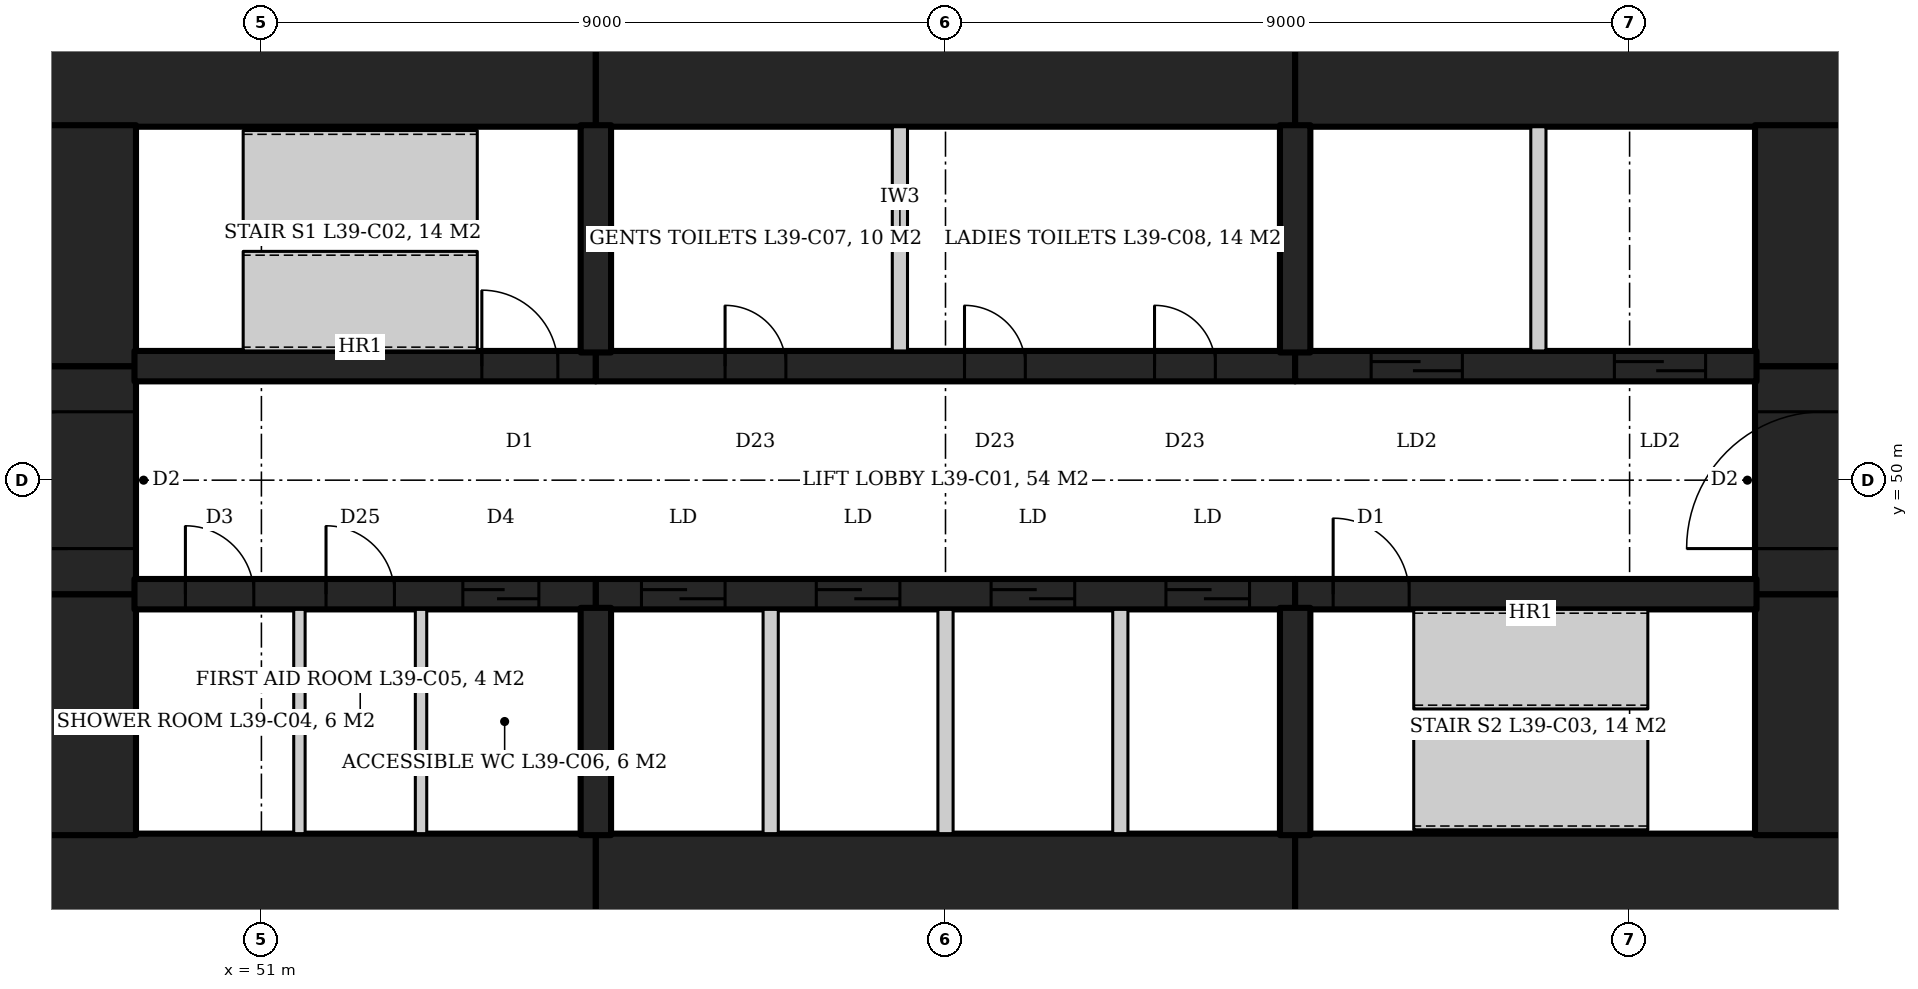
"""IFC4 building model, lengths in metres.
Left out: names, types, materials, properties, quantities, classifications, styles, units other than length and angle.
Written with IfcOpenShell. Run it as: python <this file> out.ifc"""

import sys

from ifc_helpers import new_model, si_unit, direction, frame, frame_2d, origin, place, context, subcontext, project, spatial, rectangle, extrude, element, fill, save


model = new_model("IFC4")
c1 = context("Model", 3, precision=1e-05, world=origin(), true_north=direction((0.0, 1.0)))
c2 = subcontext(c1, "Body", "Model", "MODEL_VIEW")
j1 = project(units=[si_unit("LENGTHUNIT", "METRE"), si_unit("PLANEANGLEUNIT", "RADIAN")], contexts=[c1])
p1 = place(None, origin())
s1 = spatial("IfcSite", under=j1, at=p1, CompositionType="ELEMENT")
p2 = place(p1, origin())
s2 = spatial("IfcBuilding", under=s1, at=p2, CompositionType="ELEMENT")
p3 = place(p2, frame((0.0, 0.0, 173.0)))
s3 = spatial("IfcBuildingStorey", under=s2, at=p3, CompositionType="ELEMENT", Elevation=173.0)
p4 = place(p3, frame((47.55, 55.55, 0.0), z_axis=(0.0, 0.0, 1.0), x_axis=(1.0, 0.0, 0.0)))
e1 = element("IfcWall", 1, at=p4, inside=s3, PredefinedType="SHEAR", context=c2, shape_type="SweptSolid", body=[
    extrude(rectangle(XDim=7.85, YDim=1.8, at=frame_2d((3.925, 0.0))), origin(), (0.0, 0.0, 1.0), 4.2),
])
p5 = place(p3, frame((55.4, 55.55, 0.0), z_axis=(0.0, 0.0, 1.0), x_axis=(1.0, 0.0, 0.0)))
e2 = element("IfcWall", 2, at=p5, inside=s3, PredefinedType="SHEAR", context=c2, shape_type="SweptSolid", body=[
    extrude(rectangle(XDim=9.2, YDim=1.8, at=frame_2d((4.6, 0.0))), origin(), (0.0, 0.0, 1.0), 4.2),
])
for number, where, z_axis, x_axis in (
    (3, (64.6, 55.55, 0.0), (0.0, 0.0, 1.0), (1.0, 0.0, 0.0)),
    (4, (47.55, 44.45, 0.0), (0.0, 0.0, 1.0), (1.0, 0.0, 0.0)),
):
    element("IfcWall", number, at=place(p3, frame(where, z_axis=z_axis, x_axis=x_axis)), inside=s3, PredefinedType="SHEAR", context=c2, shape_type="SweptSolid", body=[
        extrude(rectangle(XDim=7.85, YDim=1.8, at=frame_2d((3.925, 0.0))), origin(), (0.0, 0.0, 1.0), 4.2),
    ])
p6 = place(p3, frame((55.4, 44.45, 0.0), z_axis=(0.0, 0.0, 1.0), x_axis=(1.0, 0.0, 0.0)))
e5 = element("IfcWall", 5, at=p6, inside=s3, PredefinedType="SHEAR", context=c2, shape_type="SweptSolid", body=[
    extrude(rectangle(XDim=9.2, YDim=1.8, at=frame_2d((4.6, 0.0))), origin(), (0.0, 0.0, 1.0), 4.2),
])
p7 = place(p3, frame((64.6, 44.45, 0.0), z_axis=(0.0, 0.0, 1.0), x_axis=(1.0, 0.0, 0.0)))
e6 = element("IfcWall", 6, at=p7, inside=s3, PredefinedType="SHEAR", context=c2, shape_type="SweptSolid", body=[
    extrude(rectangle(XDim=7.85, YDim=1.8, at=frame_2d((3.925, 0.0))), origin(), (0.0, 0.0, 1.0), 4.2),
])
p8 = place(p3, frame((71.55, 45.33, 0.0), z_axis=(0.0, 0.0, 1.0), x_axis=(0.0, 1.0, 0.0)))
e7 = element("IfcWall", 7, at=p8, inside=s3, PredefinedType="SHEAR", context=c2, shape_type="SweptSolid", body=[
    extrude(rectangle(XDim=3.17, YDim=1.8, at=frame_2d((1.585, 0.0))), origin(), (0.0, 0.0, 1.0), 4.2),
])
p9 = place(p3, frame((71.55, 48.5, 0.0), z_axis=(0.0, 0.0, 1.0), x_axis=(0.0, 1.0, 0.0)))
e8 = element("IfcWall", 8, at=p9, inside=s3, PredefinedType="SHEAR", context=c2, shape_type="SweptSolid", body=[
    extrude(rectangle(XDim=3.0, YDim=1.8, at=frame_2d((1.5, 0.0))), origin(), (0.0, 0.0, 1.0), 4.2),
])
p10 = place(p9, frame((0.6, 0.0, 0.0)))
e9 = element("IfcOpeningElement", 9, at=p10, cuts=e8, PredefinedType="OPENING", context=c2, shape_type="SweptSolid", body=[
    extrude(rectangle(XDim=1.8, YDim=2.1, at=frame_2d((0.9, 1.05))), frame((0.0, 0.91, 0.0), z_axis=(0.0, -1.0, 0.0), x_axis=(1.0, 0.0, 0.0)), (0.0, 0.0, 1.0), 1.82),
])
for number, where, z_axis, x_axis in (
    (10, (71.55, 51.5, 0.0), (0.0, 0.0, 1.0), (0.0, 1.0, 0.0)),
    (11, (48.45, 45.33, 0.0), (0.0, 0.0, 1.0), (0.0, 1.0, 0.0)),
):
    element("IfcWall", number, at=place(p3, frame(where, z_axis=z_axis, x_axis=x_axis)), inside=s3, PredefinedType="SHEAR", context=c2, shape_type="SweptSolid", body=[
        extrude(rectangle(XDim=3.17, YDim=1.8, at=frame_2d((1.585, 0.0))), origin(), (0.0, 0.0, 1.0), 4.2),
    ])
p11 = place(p3, frame((48.45, 48.5, 0.0), z_axis=(0.0, 0.0, 1.0), x_axis=(0.0, 1.0, 0.0)))
e12 = element("IfcWall", 12, at=p11, inside=s3, PredefinedType="SHEAR", context=c2, shape_type="SweptSolid", body=[
    extrude(rectangle(XDim=3.0, YDim=1.8, at=frame_2d((1.5, 0.0))), origin(), (0.0, 0.0, 1.0), 4.2),
])
p12 = place(p11, frame((0.6, 0.0, 0.0)))
e13 = element("IfcOpeningElement", 13, at=p12, cuts=e12, PredefinedType="OPENING", context=c2, shape_type="SweptSolid", body=[
    extrude(rectangle(XDim=1.8, YDim=2.1, at=frame_2d((0.9, 1.05))), frame((0.0, 0.91, 0.0), z_axis=(0.0, -1.0, 0.0), x_axis=(1.0, 0.0, 0.0)), (0.0, 0.0, 1.0), 1.82),
])
p13 = place(p3, frame((48.45, 51.5, 0.0), z_axis=(0.0, 0.0, 1.0), x_axis=(0.0, 1.0, 0.0)))
e14 = element("IfcWall", 14, at=p13, inside=s3, PredefinedType="SHEAR", context=c2, shape_type="SweptSolid", body=[
    extrude(rectangle(XDim=3.17, YDim=1.8, at=frame_2d((1.585, 0.0))), origin(), (0.0, 0.0, 1.0), 4.2),
])
p14 = place(p3, frame((49.33, 51.5, 0.0), z_axis=(0.0, 0.0, 1.0), x_axis=(1.0, 0.0, 0.0)))
e15 = element("IfcWall", 15, at=p14, inside=s3, PredefinedType="SHEAR", context=c2, shape_type="SweptSolid", body=[
    extrude(rectangle(XDim=6.07, YDim=0.4, at=frame_2d((3.035, 0.0))), origin(), (0.0, 0.0, 1.0), 4.2),
])
p15 = place(p14, frame((4.57, 0.0, 0.0)))
e16 = element("IfcOpeningElement", 16, at=p15, cuts=e15, PredefinedType="OPENING", context=c2, shape_type="SweptSolid", body=[
    extrude(rectangle(XDim=1.0, YDim=2.1, at=frame_2d((0.5, 1.05))), frame((0.0, 0.21, 0.0), z_axis=(0.0, -1.0, 0.0), x_axis=(1.0, 0.0, 0.0)), (0.0, 0.0, 1.0), 0.42),
])
p16 = place(p3, frame((55.4, 51.5, 0.0), z_axis=(0.0, 0.0, 1.0), x_axis=(1.0, 0.0, 0.0)))
e17 = element("IfcWall", 17, at=p16, inside=s3, PredefinedType="SHEAR", context=c2, shape_type="SweptSolid", body=[
    extrude(rectangle(XDim=9.2, YDim=0.4, at=frame_2d((4.6, 0.0))), origin(), (0.0, 0.0, 1.0), 4.2),
])
p17 = place(p16, frame((1.7, 0.0, 0.0)))
e18 = element("IfcOpeningElement", 18, at=p17, cuts=e17, PredefinedType="OPENING", context=c2, shape_type="SweptSolid", body=[
    extrude(rectangle(XDim=0.8, YDim=2.1, at=frame_2d((0.4, 1.05))), frame((0.0, 0.21, 0.0), z_axis=(0.0, -1.0, 0.0), x_axis=(1.0, 0.0, 0.0)), (0.0, 0.0, 1.0), 0.42),
])
p18 = place(p16, frame((4.85, 0.0, 0.0)))
e19 = element("IfcOpeningElement", 19, at=p18, cuts=e17, PredefinedType="OPENING", context=c2, shape_type="SweptSolid", body=[
    extrude(rectangle(XDim=0.8, YDim=2.1, at=frame_2d((0.4, 1.05))), frame((0.0, 0.21, 0.0), z_axis=(0.0, -1.0, 0.0), x_axis=(1.0, 0.0, 0.0)), (0.0, 0.0, 1.0), 0.42),
])
p19 = place(p16, frame((7.35, 0.0, 0.0)))
e20 = element("IfcOpeningElement", 20, at=p19, cuts=e17, PredefinedType="OPENING", context=c2, shape_type="SweptSolid", body=[
    extrude(rectangle(XDim=0.8, YDim=2.1, at=frame_2d((0.4, 1.05))), frame((0.0, 0.21, 0.0), z_axis=(0.0, -1.0, 0.0), x_axis=(1.0, 0.0, 0.0)), (0.0, 0.0, 1.0), 0.42),
])
p20 = place(p3, frame((64.6, 51.5, 0.0), z_axis=(0.0, 0.0, 1.0), x_axis=(1.0, 0.0, 0.0)))
e21 = element("IfcWall", 21, at=p20, inside=s3, PredefinedType="SHEAR", context=c2, shape_type="SweptSolid", body=[
    extrude(rectangle(XDim=6.07, YDim=0.4, at=frame_2d((3.035, 0.0))), origin(), (0.0, 0.0, 1.0), 4.2),
])
p21 = place(p20, frame((1.0, 0.0, 0.0)))
e22 = element("IfcOpeningElement", 22, at=p21, cuts=e21, PredefinedType="OPENING", context=c2, shape_type="SweptSolid", body=[
    extrude(rectangle(XDim=1.2, YDim=2.1, at=frame_2d((0.6, 1.05))), frame((0.0, 0.21, 0.0), z_axis=(0.0, -1.0, 0.0), x_axis=(1.0, 0.0, 0.0)), (0.0, 0.0, 1.0), 0.42),
])
p22 = place(p20, frame((4.2, 0.0, 0.0)))
e23 = element("IfcOpeningElement", 23, at=p22, cuts=e21, PredefinedType="OPENING", context=c2, shape_type="SweptSolid", body=[
    extrude(rectangle(XDim=1.2, YDim=2.1, at=frame_2d((0.6, 1.05))), frame((0.0, 0.21, 0.0), z_axis=(0.0, -1.0, 0.0), x_axis=(1.0, 0.0, 0.0)), (0.0, 0.0, 1.0), 0.42),
])
p23 = place(p3, frame((49.33, 48.5, 0.0), z_axis=(0.0, 0.0, 1.0), x_axis=(1.0, 0.0, 0.0)))
e24 = element("IfcWall", 24, at=p23, inside=s3, PredefinedType="SHEAR", context=c2, shape_type="SweptSolid", body=[
    extrude(rectangle(XDim=6.07, YDim=0.4, at=frame_2d((3.035, 0.0))), origin(), (0.0, 0.0, 1.0), 4.2),
])
p24 = place(p23, frame((0.67, 0.0, 0.0)))
e25 = element("IfcOpeningElement", 25, at=p24, cuts=e24, PredefinedType="OPENING", context=c2, shape_type="SweptSolid", body=[
    extrude(rectangle(XDim=0.9, YDim=2.1, at=frame_2d((0.45, 1.05))), frame((0.0, 0.21, 0.0), z_axis=(0.0, -1.0, 0.0), x_axis=(1.0, 0.0, 0.0)), (0.0, 0.0, 1.0), 0.42),
])
p25 = place(p23, frame((2.52, 0.0, 0.0)))
e26 = element("IfcOpeningElement", 26, at=p25, cuts=e24, PredefinedType="OPENING", context=c2, shape_type="SweptSolid", body=[
    extrude(rectangle(XDim=0.9, YDim=2.1, at=frame_2d((0.45, 1.05))), frame((0.0, 0.21, 0.0), z_axis=(0.0, -1.0, 0.0), x_axis=(1.0, 0.0, 0.0)), (0.0, 0.0, 1.0), 0.42),
])
p26 = place(p23, frame((4.32, 0.0, 0.0)))
e27 = element("IfcOpeningElement", 27, at=p26, cuts=e24, PredefinedType="OPENING", context=c2, shape_type="SweptSolid", body=[
    extrude(rectangle(XDim=1.0, YDim=2.1, at=frame_2d((0.5, 1.05))), frame((0.0, 0.21, 0.0), z_axis=(0.0, -1.0, 0.0), x_axis=(1.0, 0.0, 0.0)), (0.0, 0.0, 1.0), 0.42),
])
p27 = place(p3, frame((55.4, 48.5, 0.0), z_axis=(0.0, 0.0, 1.0), x_axis=(1.0, 0.0, 0.0)))
e28 = element("IfcWall", 28, at=p27, inside=s3, PredefinedType="SHEAR", context=c2, shape_type="SweptSolid", body=[
    extrude(rectangle(XDim=9.2, YDim=0.4, at=frame_2d((4.6, 0.0))), origin(), (0.0, 0.0, 1.0), 4.2),
])
p28 = place(p27, frame((0.6, 0.0, 0.0)))
e29 = element("IfcOpeningElement", 29, at=p28, cuts=e28, PredefinedType="OPENING", context=c2, shape_type="SweptSolid", body=[
    extrude(rectangle(XDim=1.1, YDim=2.1, at=frame_2d((0.55, 1.05))), frame((0.0, 0.21, 0.0), z_axis=(0.0, -1.0, 0.0), x_axis=(1.0, 0.0, 0.0)), (0.0, 0.0, 1.0), 0.42),
])
p29 = place(p27, frame((2.9, 0.0, 0.0)))
e30 = element("IfcOpeningElement", 30, at=p29, cuts=e28, PredefinedType="OPENING", context=c2, shape_type="SweptSolid", body=[
    extrude(rectangle(XDim=1.1, YDim=2.1, at=frame_2d((0.55, 1.05))), frame((0.0, 0.21, 0.0), z_axis=(0.0, -1.0, 0.0), x_axis=(1.0, 0.0, 0.0)), (0.0, 0.0, 1.0), 0.42),
])
p30 = place(p27, frame((5.2, 0.0, 0.0)))
e31 = element("IfcOpeningElement", 31, at=p30, cuts=e28, PredefinedType="OPENING", context=c2, shape_type="SweptSolid", body=[
    extrude(rectangle(XDim=1.1, YDim=2.1, at=frame_2d((0.55, 1.05))), frame((0.0, 0.21, 0.0), z_axis=(0.0, -1.0, 0.0), x_axis=(1.0, 0.0, 0.0)), (0.0, 0.0, 1.0), 0.42),
])
p31 = place(p27, frame((7.5, 0.0, 0.0)))
e32 = element("IfcOpeningElement", 32, at=p31, cuts=e28, PredefinedType="OPENING", context=c2, shape_type="SweptSolid", body=[
    extrude(rectangle(XDim=1.1, YDim=2.1, at=frame_2d((0.55, 1.05))), frame((0.0, 0.21, 0.0), z_axis=(0.0, -1.0, 0.0), x_axis=(1.0, 0.0, 0.0)), (0.0, 0.0, 1.0), 0.42),
])
p32 = place(p3, frame((64.6, 48.5, 0.0), z_axis=(0.0, 0.0, 1.0), x_axis=(1.0, 0.0, 0.0)))
e33 = element("IfcWall", 33, at=p32, inside=s3, PredefinedType="SHEAR", context=c2, shape_type="SweptSolid", body=[
    extrude(rectangle(XDim=6.07, YDim=0.4, at=frame_2d((3.035, 0.0))), origin(), (0.0, 0.0, 1.0), 4.2),
])
p33 = place(p32, frame((0.5, 0.0, 0.0)))
e34 = element("IfcOpeningElement", 34, at=p33, cuts=e33, PredefinedType="OPENING", context=c2, shape_type="SweptSolid", body=[
    extrude(rectangle(XDim=1.0, YDim=2.1, at=frame_2d((0.5, 1.05))), frame((0.0, 0.21, 0.0), z_axis=(0.0, -1.0, 0.0), x_axis=(1.0, 0.0, 0.0)), (0.0, 0.0, 1.0), 0.42),
])
for number, where, z_axis, x_axis in (
    (35, (55.4, 51.68, 0.0), (0.0, 0.0, 1.0), (0.0, 1.0, 0.0)),
    (36, (64.6, 51.68, 0.0), (0.0, 0.0, 1.0), (0.0, 1.0, 0.0)),
    (37, (55.4, 48.32, 0.0), (0.0, 0.0, 1.0), (0.0, -1.0, 0.0)),
    (38, (64.6, 48.32, 0.0), (0.0, 0.0, 1.0), (0.0, -1.0, 0.0)),
):
    element("IfcWall", number, at=place(p3, frame(where, z_axis=z_axis, x_axis=x_axis)), inside=s3, PredefinedType="SHEAR", context=c2, shape_type="SweptSolid", body=[
        extrude(rectangle(XDim=2.99, YDim=0.4, at=frame_2d((1.495, 0.0))), origin(), (0.0, 0.0, 1.0), 4.2),
    ])
for number, where, z_axis, x_axis in (
    (39, (57.7, 45.35, 0.0), (0.0, 0.0, 1.0), (0.0, 1.0, 0.0)),
    (40, (60.0, 45.35, 0.0), (0.0, 0.0, 1.0), (0.0, 1.0, 0.0)),
    (41, (62.3, 45.35, 0.0), (0.0, 0.0, 1.0), (0.0, 1.0, 0.0)),
    (42, (67.8, 51.7, 0.0), (0.0, 0.0, 1.0), (0.0, 1.0, 0.0)),
):
    element("IfcWall", number, at=place(p3, frame(where, z_axis=z_axis, x_axis=x_axis)), inside=s3, PredefinedType="PARTITIONING", context=c2, shape_type="SweptSolid", body=[
        extrude(rectangle(XDim=2.95, YDim=0.2, at=frame_2d((1.475, 0.0))), origin(), (0.0, 0.0, 1.0), 4.2),
    ])
for number, where, z_axis, x_axis in (
    (43, (51.5, 45.35, 0.0), (0.0, 0.0, 1.0), (0.0, 1.0, 0.0)),
    (44, (53.1, 45.35, 0.0), (0.0, 0.0, 1.0), (0.0, 1.0, 0.0)),
):
    element("IfcWall", number, at=place(p3, frame(where, z_axis=z_axis, x_axis=x_axis)), inside=s3, PredefinedType="PARTITIONING", context=c2, shape_type="SweptSolid", body=[
        extrude(rectangle(XDim=2.95, YDim=0.15, at=frame_2d((1.475, 0.0))), origin(), (0.0, 0.0, 1.0), 4.04),
    ])
p34 = place(p3, frame((59.4, 51.7, 0.0), z_axis=(0.0, 0.0, 1.0), x_axis=(0.0, 1.0, 0.0)))
e45 = element("IfcWall", 45, at=p34, inside=s3, PredefinedType="PARTITIONING", context=c2, shape_type="SweptSolid", body=[
    extrude(rectangle(XDim=2.95, YDim=0.2, at=frame_2d((1.475, 0.0))), origin(), (0.0, 0.0, 1.0), 4.04),
])
p35 = place(p15, origin())
e46 = element("IfcDoor", 46, at=p35, inside=s3, OperationType="SINGLE_SWING_LEFT", PredefinedType="DOOR", context=c2, shape_type="SweptSolid", body=[
    extrude(rectangle(XDim=1.0, YDim=2.1, at=frame_2d((0.5, 1.05))), frame((0.0, 0.025, 0.0), z_axis=(0.0, -1.0, 0.0), x_axis=(1.0, 0.0, 0.0)), (0.0, 0.0, 1.0), 0.05),
])
fill(e16, e46)
p36 = place(p33, origin())
e47 = element("IfcDoor", 47, at=p36, inside=s3, OperationType="SINGLE_SWING_LEFT", PredefinedType="DOOR", context=c2, shape_type="SweptSolid", body=[
    extrude(rectangle(XDim=1.0, YDim=2.1, at=frame_2d((0.5, 1.05))), frame((0.0, 0.025, 0.0), z_axis=(0.0, -1.0, 0.0), x_axis=(1.0, 0.0, 0.0)), (0.0, 0.0, 1.0), 0.05),
])
fill(e34, e47)
p37 = place(p21, origin())
e48 = element("IfcDoor", 48, at=p37, inside=s3, OperationType="SLIDING_TO_LEFT", PredefinedType="DOOR", context=c2, shape_type="SweptSolid", body=[
    extrude(rectangle(XDim=1.2, YDim=2.1, at=frame_2d((0.6, 1.05))), frame((0.0, 0.025, 0.0), z_axis=(0.0, -1.0, 0.0), x_axis=(1.0, 0.0, 0.0)), (0.0, 0.0, 1.0), 0.05),
])
fill(e22, e48)
p38 = place(p22, origin())
e49 = element("IfcDoor", 49, at=p38, inside=s3, OperationType="SLIDING_TO_LEFT", PredefinedType="DOOR", context=c2, shape_type="SweptSolid", body=[
    extrude(rectangle(XDim=1.2, YDim=2.1, at=frame_2d((0.6, 1.05))), frame((0.0, 0.025, 0.0), z_axis=(0.0, -1.0, 0.0), x_axis=(1.0, 0.0, 0.0)), (0.0, 0.0, 1.0), 0.05),
])
fill(e23, e49)
p39 = place(p28, origin())
e50 = element("IfcDoor", 50, at=p39, inside=s3, OperationType="SLIDING_TO_LEFT", PredefinedType="DOOR", context=c2, shape_type="SweptSolid", body=[
    extrude(rectangle(XDim=1.1, YDim=2.1, at=frame_2d((0.55, 1.05))), frame((0.0, 0.025, 0.0), z_axis=(0.0, -1.0, 0.0), x_axis=(1.0, 0.0, 0.0)), (0.0, 0.0, 1.0), 0.05),
])
fill(e29, e50)
p40 = place(p29, origin())
e51 = element("IfcDoor", 51, at=p40, inside=s3, OperationType="SLIDING_TO_LEFT", PredefinedType="DOOR", context=c2, shape_type="SweptSolid", body=[
    extrude(rectangle(XDim=1.1, YDim=2.1, at=frame_2d((0.55, 1.05))), frame((0.0, 0.025, 0.0), z_axis=(0.0, -1.0, 0.0), x_axis=(1.0, 0.0, 0.0)), (0.0, 0.0, 1.0), 0.05),
])
fill(e30, e51)
p41 = place(p30, origin())
e52 = element("IfcDoor", 52, at=p41, inside=s3, OperationType="SLIDING_TO_LEFT", PredefinedType="DOOR", context=c2, shape_type="SweptSolid", body=[
    extrude(rectangle(XDim=1.1, YDim=2.1, at=frame_2d((0.55, 1.05))), frame((0.0, 0.025, 0.0), z_axis=(0.0, -1.0, 0.0), x_axis=(1.0, 0.0, 0.0)), (0.0, 0.0, 1.0), 0.05),
])
fill(e31, e52)
p42 = place(p31, origin())
e53 = element("IfcDoor", 53, at=p42, inside=s3, OperationType="SLIDING_TO_LEFT", PredefinedType="DOOR", context=c2, shape_type="SweptSolid", body=[
    extrude(rectangle(XDim=1.1, YDim=2.1, at=frame_2d((0.55, 1.05))), frame((0.0, 0.025, 0.0), z_axis=(0.0, -1.0, 0.0), x_axis=(1.0, 0.0, 0.0)), (0.0, 0.0, 1.0), 0.05),
])
fill(e32, e53)
p43 = place(p24, origin())
e54 = element("IfcDoor", 54, at=p43, inside=s3, OperationType="SINGLE_SWING_RIGHT", PredefinedType="DOOR", context=c2, shape_type="SweptSolid", body=[
    extrude(rectangle(XDim=0.9, YDim=2.1, at=frame_2d((0.45, 1.05))), frame((0.0, 0.025, 0.0), z_axis=(0.0, -1.0, 0.0), x_axis=(1.0, 0.0, 0.0)), (0.0, 0.0, 1.0), 0.05),
])
fill(e25, e54)
p44 = place(p25, origin())
e55 = element("IfcDoor", 55, at=p44, inside=s3, OperationType="SINGLE_SWING_RIGHT", PredefinedType="DOOR", context=c2, shape_type="SweptSolid", body=[
    extrude(rectangle(XDim=0.9, YDim=2.1, at=frame_2d((0.45, 1.05))), frame((0.0, 0.025, 0.0), z_axis=(0.0, -1.0, 0.0), x_axis=(1.0, 0.0, 0.0)), (0.0, 0.0, 1.0), 0.05),
])
fill(e26, e55)
p45 = place(p26, origin())
e56 = element("IfcDoor", 56, at=p45, inside=s3, OperationType="SLIDING_TO_LEFT", PredefinedType="DOOR", context=c2, shape_type="SweptSolid", body=[
    extrude(rectangle(XDim=1.0, YDim=2.1, at=frame_2d((0.5, 1.05))), frame((0.0, 0.025, 0.0), z_axis=(0.0, -1.0, 0.0), x_axis=(1.0, 0.0, 0.0)), (0.0, 0.0, 1.0), 0.05),
])
fill(e27, e56)
p46 = place(p10, origin())
e57 = element("IfcDoor", 57, at=p46, inside=s3, OperationType="DOUBLE_DOOR_DOUBLE_SWING", PredefinedType="DOOR", context=c2, shape_type="SweptSolid", body=[
    extrude(rectangle(XDim=1.8, YDim=2.1, at=frame_2d((0.9, 1.05))), frame((0.0, 0.025, 0.0), z_axis=(0.0, -1.0, 0.0), x_axis=(1.0, 0.0, 0.0)), (0.0, 0.0, 1.0), 0.05),
])
fill(e9, e57)
p47 = place(p12, origin())
e58 = element("IfcDoor", 58, at=p47, inside=s3, OperationType="DOUBLE_DOOR_DOUBLE_SWING", PredefinedType="DOOR", context=c2, shape_type="SweptSolid", body=[
    extrude(rectangle(XDim=1.8, YDim=2.1, at=frame_2d((0.9, 1.05))), frame((0.0, 0.025, 0.0), z_axis=(0.0, -1.0, 0.0), x_axis=(1.0, 0.0, 0.0)), (0.0, 0.0, 1.0), 0.05),
])
fill(e13, e58)
p48 = place(p17, origin())
e59 = element("IfcDoor", 59, at=p48, inside=s3, OperationType="SINGLE_SWING_LEFT", PredefinedType="DOOR", context=c2, shape_type="SweptSolid", body=[
    extrude(rectangle(XDim=0.8, YDim=2.1, at=frame_2d((0.4, 1.05))), frame((0.0, 0.025, 0.0), z_axis=(0.0, -1.0, 0.0), x_axis=(1.0, 0.0, 0.0)), (0.0, 0.0, 1.0), 0.05),
])
fill(e18, e59)
p49 = place(p18, origin())
e60 = element("IfcDoor", 60, at=p49, inside=s3, OperationType="SINGLE_SWING_LEFT", PredefinedType="DOOR", context=c2, shape_type="SweptSolid", body=[
    extrude(rectangle(XDim=0.8, YDim=2.1, at=frame_2d((0.4, 1.05))), frame((0.0, 0.025, 0.0), z_axis=(0.0, -1.0, 0.0), x_axis=(1.0, 0.0, 0.0)), (0.0, 0.0, 1.0), 0.05),
])
fill(e19, e60)
p50 = place(p19, origin())
e61 = element("IfcDoor", 61, at=p50, inside=s3, OperationType="SINGLE_SWING_LEFT", PredefinedType="DOOR", context=c2, shape_type="SweptSolid", body=[
    extrude(rectangle(XDim=0.8, YDim=2.1, at=frame_2d((0.4, 1.05))), frame((0.0, 0.025, 0.0), z_axis=(0.0, -1.0, 0.0), x_axis=(1.0, 0.0, 0.0)), (0.0, 0.0, 1.0), 0.05),
])
fill(e20, e61)
save(model, sys.argv[1])
